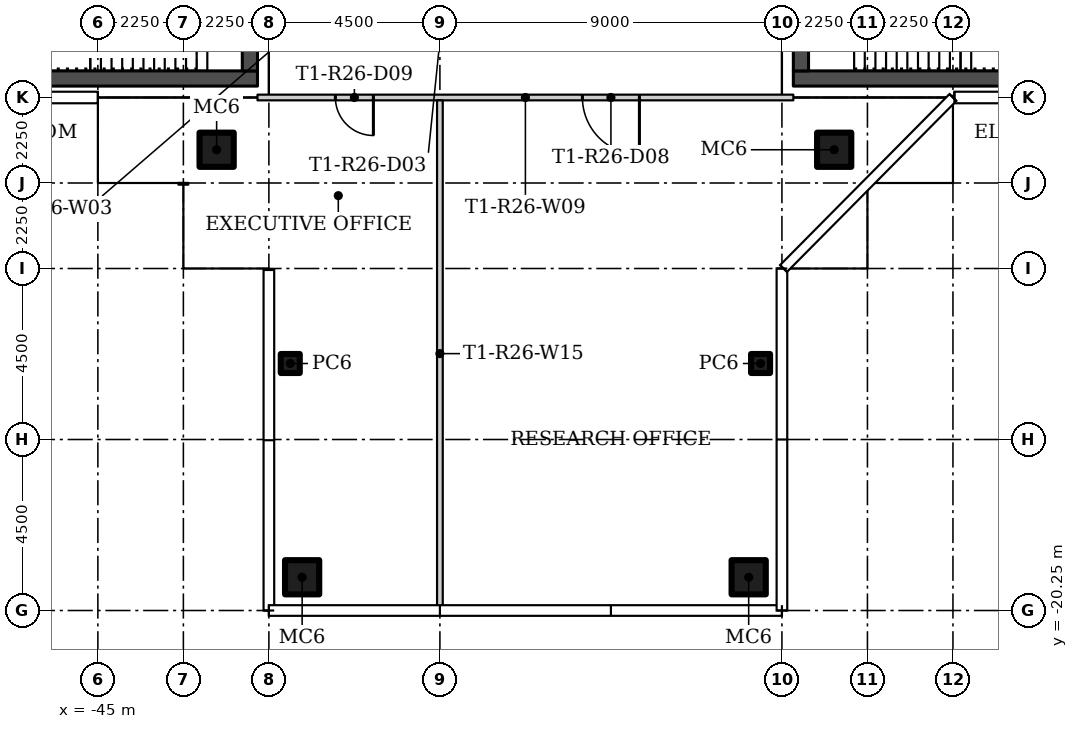
"""IFC4 building model, lengths in metres.
Left out: names, types, materials, properties, quantities, classifications, styles, units other than length and angle.
Written with IfcOpenShell. Run it as: python <this file> out.ifc"""

import sys

from ifc_helpers import new_model, si_unit, direction, frame, frame_2d, origin, origin_2d, place, context, subcontext, project, spatial, rectangle, hollow_rectangle, extrude, element, fill, save


model = new_model("IFC4")
c1 = context("Model", 3, precision=1e-05, world=origin(), true_north=direction((0.0, 1.0)))
c2 = subcontext(c1, "Body", "Model", "MODEL_VIEW")
j1 = project(units=[si_unit("LENGTHUNIT", "METRE"), si_unit("PLANEANGLEUNIT", "RADIAN")], contexts=[c1])
p1 = place(None, origin())
s1 = spatial("IfcSite", under=j1, at=p1, CompositionType="ELEMENT")
p2 = place(p1, origin())
s2 = spatial("IfcBuilding", under=s1, at=p2, CompositionType="ELEMENT")
p3 = place(p2, frame((0.0, 0.0, 242.1)))
s3 = spatial("IfcBuildingStorey", under=s2, at=p3, CompositionType="ELEMENT", Elevation=242.1)
for number, where in (
    (1, (-25.625, -8.125, 0.0)),
    (2, (-41.875, -8.125, 0.0)),
):
    element("IfcColumn", number, at=place(p3, frame(where)), inside=s3, PredefinedType="COLUMN", context=c2, shape_type="SweptSolid", body=[
        extrude(hollow_rectangle(XDim=0.9, YDim=0.9, WallThickness=0.036, at=origin_2d()), origin(), (0.0, 0.0, 1.0), 3.55),
    ])
p4 = place(p3, frame((-39.938, -13.75, 0.0)))
e3 = element("IfcColumn", 3, at=p4, inside=s3, PredefinedType="COLUMN", context=c2, shape_type="SweptSolid", body=[
    extrude(hollow_rectangle(XDim=0.5, YDim=0.5, WallThickness=0.016, at=origin_2d()), origin(), (0.0, 0.0, 1.0), 3.55),
])
p5 = place(p3, frame((-39.625, -19.375, 0.0)))
e4 = element("IfcColumn", 4, at=p5, inside=s3, PredefinedType="COLUMN", context=c2, shape_type="SweptSolid", body=[
    extrude(hollow_rectangle(XDim=0.9, YDim=0.9, WallThickness=0.036, at=origin_2d()), origin(), (0.0, 0.0, 1.0), 3.55),
])
p6 = place(p3, frame((-27.562, -13.75, 0.0)))
e5 = element("IfcColumn", 5, at=p6, inside=s3, PredefinedType="COLUMN", context=c2, shape_type="SweptSolid", body=[
    extrude(hollow_rectangle(XDim=0.5, YDim=0.5, WallThickness=0.016, at=origin_2d()), origin(), (0.0, 0.0, 1.0), 3.55),
])
p7 = place(p3, frame((-27.875, -19.375, 0.0)))
e6 = element("IfcColumn", 6, at=p7, inside=s3, PredefinedType="COLUMN", context=c2, shape_type="SweptSolid", body=[
    extrude(hollow_rectangle(XDim=0.9, YDim=0.9, WallThickness=0.036, at=origin_2d()), origin(), (0.0, 0.0, 1.0), 3.55),
])
p8 = place(p3, frame((-26.7, -6.75, 0.0), z_axis=(0.0, 0.0, 1.0), x_axis=(-1.0, 0.0, 0.0)))
e7 = element("IfcWall", 7, at=p8, inside=s3, PredefinedType="PARTITIONING", context=c2, shape_type="SweptSolid", body=[
    extrude(rectangle(XDim=14.1, YDim=0.15, at=frame_2d((7.05, 0.0))), origin(), (0.0, 0.0, 1.0), 3.55),
])
p9 = place(p8, frame((4.05, 0.0, 0.0)))
e8 = element("IfcOpeningElement", 8, at=p9, cuts=e7, PredefinedType="OPENING", context=c2, shape_type="SweptSolid", body=[
    extrude(rectangle(XDim=1.5, YDim=2.1, at=frame_2d((0.75, 1.05))), frame((0.0, 0.085, 0.0), z_axis=(0.0, -1.0, 0.0), x_axis=(1.0, 0.0, 0.0)), (0.0, 0.0, 1.0), 0.17),
])
p10 = place(p8, frame((11.05, 0.0, 0.0)))
e9 = element("IfcOpeningElement", 9, at=p10, cuts=e7, PredefinedType="OPENING", context=c2, shape_type="SweptSolid", body=[
    extrude(rectangle(XDim=1.0, YDim=2.4, at=frame_2d((0.5, 1.2))), frame((0.0, 0.085, 0.0), z_axis=(0.0, -1.0, 0.0), x_axis=(1.0, 0.0, 0.0)), (0.0, 0.0, 1.0), 0.17),
])
p11 = place(p3, frame((-36.0, -20.155, 0.0), z_axis=(0.0, 0.0, 1.0), x_axis=(0.0, 1.0, 0.0)))
e10 = element("IfcWall", 10, at=p11, inside=s3, PredefinedType="PARTITIONING", context=c2, shape_type="SweptSolid", body=[
    extrude(rectangle(XDim=13.33, YDim=0.15, at=frame_2d((6.665, 0.0))), origin(), (0.0, 0.0, 1.0), 3.55),
])
p12 = place(p3, frame((-26.7, -6.25, 0.0)))
e11 = element("IfcWall", 11, at=p12, inside=s3, PredefinedType="SHEAR", context=c2, shape_type="SweptSolid", body=[
    extrude(rectangle(XDim=12.9, YDim=0.4, at=frame_2d((6.45, 0.0))), origin(), (0.0, 0.0, 1.0), 3.55),
])
p13 = place(p3, frame((-26.5, 6.05, 0.0), z_axis=(0.0, 0.0, 1.0), x_axis=(0.0, -1.0, 0.0)))
e12 = element("IfcWall", 12, at=p13, inside=s3, PredefinedType="SHEAR", context=c2, shape_type="SweptSolid", body=[
    extrude(rectangle(XDim=12.1, YDim=0.4, at=frame_2d((6.05, 0.0))), origin(), (0.0, 0.0, 1.0), 3.55),
])
p14 = place(p13, frame((3.9, 0.0, 0.0)))
e13 = element("IfcOpeningElement", 13, at=p14, cuts=e12, PredefinedType="OPENING", context=c2, shape_type="SweptSolid", body=[
    extrude(rectangle(XDim=1.8, YDim=2.4, at=frame_2d((0.9, 1.2))), frame((0.0, 0.21, 0.0), z_axis=(0.0, -1.0, 0.0), x_axis=(1.0, 0.0, 0.0)), (0.0, 0.0, 1.0), 0.42),
])
p15 = place(p3, frame((-40.8, -6.25, 0.0), z_axis=(0.0, 0.0, 1.0), x_axis=(-1.0, 0.0, 0.0)))
e14 = element("IfcWall", 14, at=p15, inside=s3, PredefinedType="SHEAR", context=c2, shape_type="SweptSolid", body=[
    extrude(rectangle(XDim=12.9, YDim=0.4, at=frame_2d((6.45, 0.0))), origin(), (0.0, 0.0, 1.0), 3.55),
])
p16 = place(p3, frame((-41.0, -6.05, 0.0), z_axis=(0.0, 0.0, 1.0), x_axis=(0.0, 1.0, 0.0)))
e15 = element("IfcWall", 15, at=p16, inside=s3, PredefinedType="SHEAR", context=c2, shape_type="SweptSolid", body=[
    extrude(rectangle(XDim=12.1, YDim=0.4, at=frame_2d((6.05, 0.0))), origin(), (0.0, 0.0, 1.0), 3.55),
])
p17 = place(p16, frame((6.4, 0.0, 0.0)))
e16 = element("IfcOpeningElement", 16, at=p17, cuts=e15, PredefinedType="OPENING", context=c2, shape_type="SweptSolid", body=[
    extrude(rectangle(XDim=1.8, YDim=2.4, at=frame_2d((0.9, 1.2))), frame((0.0, 0.21, 0.0), z_axis=(0.0, -1.0, 0.0), x_axis=(1.0, 0.0, 0.0)), (0.0, 0.0, 1.0), 0.42),
])
p18 = place(p9, origin())
e17 = element("IfcDoor", 17, at=p18, inside=s3, OperationType="DOUBLE_DOOR_SINGLE_SWING", PredefinedType="DOOR", context=c2, shape_type="SweptSolid", body=[
    extrude(rectangle(XDim=1.5, YDim=2.1, at=frame_2d((0.75, 1.05))), frame((0.0, 0.025, 0.0), z_axis=(0.0, -1.0, 0.0), x_axis=(1.0, 0.0, 0.0)), (0.0, 0.0, 1.0), 0.05),
])
fill(e8, e17)
p19 = place(p10, origin())
e18 = element("IfcDoor", 18, at=p19, inside=s3, OperationType="SINGLE_SWING_RIGHT", PredefinedType="DOOR", context=c2, shape_type="SweptSolid", body=[
    extrude(rectangle(XDim=1.0, YDim=2.4, at=frame_2d((0.5, 1.2))), frame((0.0, 0.025, 0.0), z_axis=(0.0, -1.0, 0.0), x_axis=(1.0, 0.0, 0.0)), (0.0, 0.0, 1.0), 0.05),
])
fill(e9, e18)
save(model, sys.argv[1])
